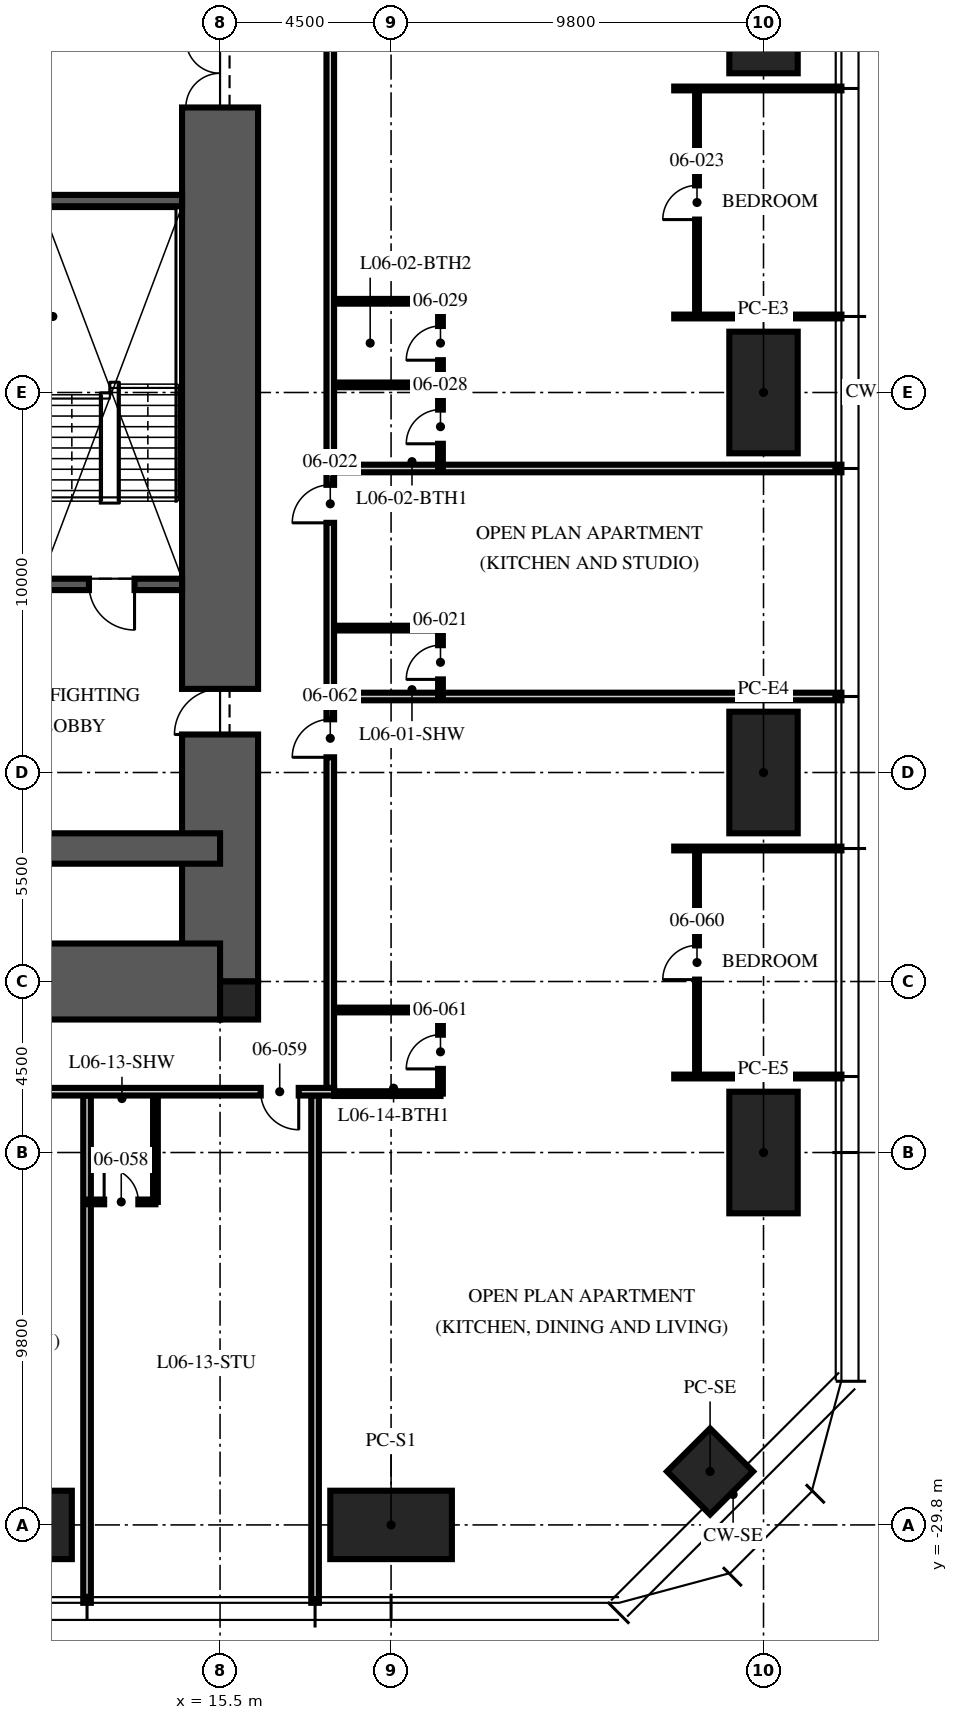
"""IFC4 building model, lengths in metres.
Left out: names, types, materials, properties, quantities, classifications, styles, units other than length and angle.
Written with IfcOpenShell. Run it as: python <this file> out.ifc"""

import sys

from ifc_helpers import new_model, si_unit, direction, frame, frame_2d, origin, origin_2d, place, context, subcontext, project, spatial, rectangle, hollow_rectangle, extrude, element, fill, save


model = new_model("IFC4")
c1 = context("Model", 3, precision=1e-05, world=origin(), true_north=direction((0.0, 1.0)))
c2 = subcontext(c1, "Body", "Model", "MODEL_VIEW")
j1 = project(units=[si_unit("LENGTHUNIT", "METRE"), si_unit("PLANEANGLEUNIT", "RADIAN")], contexts=[c1])
p1 = place(None, origin())
s1 = spatial("IfcSite", under=j1, at=p1, CompositionType="ELEMENT")
p2 = place(p1, origin())
s2 = spatial("IfcBuilding", under=s1, at=p2, CompositionType="ELEMENT")
p3 = place(p2, frame((0.0, 0.0, 28.5)))
s3 = spatial("IfcBuildingStorey", under=s2, at=p3, CompositionType="ELEMENT", Elevation=28.5)
p4 = place(p3, frame((15.5, -15.5, -0.25), z_axis=(0.0, 0.0, 1.0), x_axis=(0.0, 1.0, 0.0)))
e1 = element("IfcWall", 1, at=p4, inside=s3, PredefinedType="SHEAR", context=c2, shape_type="SweptSolid", body=[
    extrude(rectangle(XDim=31.0, YDim=2.0, at=frame_2d((15.5, 0.0))), origin(), (0.0, 0.0, 1.0), 3.75),
])
p5 = place(p4, frame((6.5, 0.0, 0.25)))
e2 = element("IfcOpeningElement", 2, at=p5, cuts=e1, PredefinedType="OPENING", context=c2, shape_type="SweptSolid", body=[
    extrude(rectangle(XDim=1.2, YDim=2.1, at=frame_2d((0.6, 1.05))), frame((0.0, 1.01, 0.0), z_axis=(0.0, -1.0, 0.0), x_axis=(1.0, 0.0, 0.0)), (0.0, 0.0, 1.0), 2.02),
])
p6 = place(p4, frame((23.0, 0.0, 0.25)))
e3 = element("IfcOpeningElement", 3, at=p6, cuts=e1, PredefinedType="OPENING", context=c2, shape_type="SweptSolid", body=[
    extrude(rectangle(XDim=1.8, YDim=2.1, at=frame_2d((0.9, 1.05))), frame((0.0, 1.01, 0.0), z_axis=(0.0, -1.0, 0.0), x_axis=(1.0, 0.0, 0.0)), (0.0, 0.0, 1.0), 2.02),
])
p7 = place(p3, frame((-15.5, -15.5, -0.25), z_axis=(0.0, 0.0, 1.0), x_axis=(1.0, 0.0, 0.0)))
e4 = element("IfcWall", 4, at=p7, inside=s3, PredefinedType="SHEAR", context=c2, shape_type="SweptSolid", body=[
    extrude(rectangle(XDim=31.0, YDim=2.0, at=frame_2d((15.5, 0.0))), origin(), (0.0, 0.0, 1.0), 3.75),
])
p8 = place(p3, frame((-15.5, -12.0, -0.25), z_axis=(0.0, 0.0, 1.0), x_axis=(1.0, 0.0, 0.0)))
e5 = element("IfcWall", 5, at=p8, inside=s3, PredefinedType="SHEAR", context=c2, shape_type="SweptSolid", body=[
    extrude(rectangle(XDim=31.0, YDim=0.8, at=frame_2d((15.5, 0.0))), origin(), (0.0, 0.0, 1.0), 3.75),
])
p9 = place(p3, frame((16.0, -16.0, -0.25), z_axis=(0.0, 0.0, 1.0), x_axis=(1.0, 0.0, 0.0)))
e6 = element("IfcColumn", 6, at=p9, inside=s3, PredefinedType="COLUMN", context=c2, shape_type="SweptSolid", body=[
    extrude(rectangle(XDim=1.0, YDim=1.0, at=origin_2d()), origin(), (0.0, 0.0, 1.0), 3.75),
])
for number, where, z_axis, x_axis in (
    (7, (29.8, 10.0, 0.0), (0.0, 0.0, 1.0), (0.0, 1.0, 0.0)),
    (8, (29.8, 0.0, 0.0), (0.0, 0.0, 1.0), (0.0, 1.0, 0.0)),
    (9, (29.8, -10.0, 0.0), (0.0, 0.0, 1.0), (0.0, 1.0, 0.0)),
    (10, (29.8, -20.0, 0.0), (0.0, 0.0, 1.0), (0.0, 1.0, 0.0)),
    (11, (20.0, -29.8, 0.0), (0.0, 0.0, 1.0), (1.0, 0.0, 0.0)),
    (12, (10.0, -29.8, 0.0), (0.0, 0.0, 1.0), (1.0, 0.0, 0.0)),
):
    element("IfcColumn", number, at=place(p3, frame(where, z_axis=z_axis, x_axis=x_axis)), inside=s3, PredefinedType="COLUMN", context=c2, shape_type="SweptSolid", body=[
        extrude(hollow_rectangle(XDim=3.2, YDim=1.8, WallThickness=0.2, at=origin_2d()), origin(), (0.0, 0.0, 1.0), 3.75),
    ])
p10 = place(p3, frame((28.394, -28.394, 0.0), z_axis=(0.0, 0.0, 1.0), x_axis=(0.707106781187, 0.707106781187, 0.0)))
e13 = element("IfcColumn", 13, at=p10, inside=s3, PredefinedType="COLUMN", context=c2, shape_type="SweptSolid", body=[
    extrude(hollow_rectangle(XDim=1.6, YDim=1.6, WallThickness=0.1, at=origin_2d()), origin(), (0.0, 0.0, 1.0), 3.75),
])
p11 = place(p3, frame((14.5, -5.05, 0.0), z_axis=(0.0, 0.0, 1.0), x_axis=(-1.0, 0.0, 0.0)))
e14 = element("IfcWall", 14, at=p11, inside=s3, PredefinedType="SOLIDWALL", context=c2, shape_type="SweptSolid", body=[
    extrude(rectangle(XDim=5.7, YDim=0.3, at=frame_2d((2.85, 0.0))), origin(), (0.0, 0.0, 1.0), 3.5),
])
p12 = place(p11, frame((1.25, 0.0, 0.0)))
e15 = element("IfcOpeningElement", 15, at=p12, cuts=e14, PredefinedType="OPENING", context=c2, shape_type="SweptSolid", body=[
    extrude(rectangle(XDim=1.2, YDim=2.1, at=frame_2d((0.6, 1.05))), frame((0.0, 0.16, 0.0), z_axis=(0.0, -1.0, 0.0), x_axis=(1.0, 0.0, 0.0)), (0.0, 0.0, 1.0), 0.32),
])
p13 = place(p3, frame((14.5, 5.05, 0.0), z_axis=(0.0, 0.0, 1.0), x_axis=(-1.0, 0.0, 0.0)))
e16 = element("IfcWall", 16, at=p13, inside=s3, PredefinedType="SOLIDWALL", context=c2, shape_type="SweptSolid", body=[
    extrude(rectangle(XDim=3.7, YDim=0.3, at=frame_2d((1.85, 0.0))), origin(), (0.0, 0.0, 1.0), 3.5),
])
for number, where, z_axis, x_axis in (
    (17, (18.5, -8.0, 0.0), (0.0, 0.0, 1.0), (1.0, 0.0, 0.0)),
    (18, (18.5, -2.0, 0.0), (0.0, 0.0, 1.0), (1.0, 0.0, 0.0)),
):
    element("IfcWall", number, at=place(p3, frame(where, z_axis=z_axis, x_axis=x_axis)), inside=s3, PredefinedType="PARTITIONING", context=c2, shape_type="SweptSolid", body=[
        extrude(rectangle(XDim=13.35, YDim=0.2, at=frame_2d((6.675, 0.0))), origin(), (0.0, 0.0, 1.0), 2.71),
    ])
for number, where, z_axis, x_axis in (
    (19, (27.45, 2.0, 0.0), (0.0, 0.0, 1.0), (1.0, 0.0, 0.0)),
    (20, (27.45, 8.0, 0.0), (0.0, 0.0, 1.0), (1.0, 0.0, 0.0)),
):
    element("IfcWall", number, at=place(p3, frame(where, z_axis=z_axis, x_axis=x_axis)), inside=s3, PredefinedType="PARTITIONING", context=c2, shape_type="SweptSolid", body=[
        extrude(rectangle(XDim=4.4, YDim=0.1, at=frame_2d((2.2, 0.0))), origin(), (0.0, 0.0, 1.0), 2.71),
    ])
p14 = place(p3, frame((12.0, -18.5, 0.0), z_axis=(0.0, 0.0, 1.0), x_axis=(0.0, -1.0, 0.0)))
e21 = element("IfcWall", 21, at=p14, inside=s3, PredefinedType="PARTITIONING", context=c2, shape_type="SweptSolid", body=[
    extrude(rectangle(XDim=13.35, YDim=0.2, at=frame_2d((6.675, 0.0))), origin(), (0.0, 0.0, 1.0), 2.71),
])
p15 = place(p3, frame((18.0, -18.5, 0.0), z_axis=(0.0, 0.0, 1.0), x_axis=(0.0, -1.0, 0.0)))
e22 = element("IfcWall", 22, at=p15, inside=s3, PredefinedType="PARTITIONING", context=c2, shape_type="SweptSolid", body=[
    extrude(rectangle(XDim=13.35, YDim=0.2, at=frame_2d((6.675, 0.0))), origin(), (0.0, 0.0, 1.0), 2.3),
])
for number, where, z_axis, x_axis in (
    (23, (27.45, -18.0, 0.0), (0.0, 0.0, 1.0), (1.0, 0.0, 0.0)),
    (24, (27.45, -12.0, 0.0), (0.0, 0.0, 1.0), (1.0, 0.0, 0.0)),
):
    element("IfcWall", number, at=place(p3, frame(where, z_axis=z_axis, x_axis=x_axis)), inside=s3, PredefinedType="PARTITIONING", context=c2, shape_type="SweptSolid", body=[
        extrude(rectangle(XDim=4.4, YDim=0.1, at=frame_2d((2.2, 0.0))), origin(), (0.0, 0.0, 1.0), 2.71),
    ])
p16 = place(p3, frame((21.3, -8.0, 0.0), z_axis=(0.0, 0.0, 1.0), x_axis=(0.0, 1.0, 0.0)))
e25 = element("IfcWall", 25, at=p16, inside=s3, PredefinedType="PARTITIONING", context=c2, shape_type="SweptSolid", body=[
    extrude(rectangle(XDim=1.8, YDim=0.125, at=frame_2d((0.9, 0.0))), origin(), (0.0, 0.0, 1.0), 3.5),
])
p17 = place(p16, frame((0.45, 0.0, 0.0)))
e26 = element("IfcOpeningElement", 26, at=p17, cuts=e25, PredefinedType="OPENING", context=c2, shape_type="SweptSolid", body=[
    extrude(rectangle(XDim=0.9, YDim=2.1, at=frame_2d((0.45, 1.05))), frame((0.0, 0.073, 0.0), z_axis=(0.0, -1.0, 0.0), x_axis=(1.0, 0.0, 0.0)), (0.0, 0.0, 1.0), 0.145),
])
p18 = place(p3, frame((18.5, -6.2, 0.0), z_axis=(0.0, 0.0, 1.0), x_axis=(1.0, 0.0, 0.0)))
e27 = element("IfcWall", 27, at=p18, inside=s3, PredefinedType="PARTITIONING", context=c2, shape_type="SweptSolid", body=[
    extrude(rectangle(XDim=2.8, YDim=0.125, at=frame_2d((1.4, 0.0))), origin(), (0.0, 0.0, 1.0), 3.5),
])
p19 = place(p3, frame((28.05, 2.0, 0.0), z_axis=(0.0, 0.0, 1.0), x_axis=(0.0, 1.0, 0.0)))
e28 = element("IfcWall", 28, at=p19, inside=s3, PredefinedType="PARTITIONING", context=c2, shape_type="SweptSolid", body=[
    extrude(rectangle(XDim=6.0, YDim=0.1, at=frame_2d((3.0, 0.0))), origin(), (0.0, 0.0, 1.0), 2.61),
])
p20 = place(p19, frame((2.55, 0.0, 0.0)))
e29 = element("IfcOpeningElement", 29, at=p20, cuts=e28, PredefinedType="OPENING", context=c2, shape_type="SweptSolid", body=[
    extrude(rectangle(XDim=0.9, YDim=2.1, at=frame_2d((0.45, 1.05))), frame((0.0, 0.06, 0.0), z_axis=(0.0, -1.0, 0.0), x_axis=(1.0, 0.0, 0.0)), (0.0, 0.0, 1.0), 0.12),
])
p21 = place(p3, frame((21.3, -2.0, 0.0), z_axis=(0.0, 0.0, 1.0), x_axis=(0.0, 1.0, 0.0)))
e30 = element("IfcWall", 30, at=p21, inside=s3, PredefinedType="PARTITIONING", context=c2, shape_type="SweptSolid", body=[
    extrude(rectangle(XDim=4.4, YDim=0.125, at=frame_2d((2.2, 0.0))), origin(), (0.0, 0.0, 1.0), 2.492),
])
p22 = place(p21, frame((0.65, 0.0, 0.0)))
e31 = element("IfcOpeningElement", 31, at=p22, cuts=e30, PredefinedType="OPENING", context=c2, shape_type="SweptSolid", body=[
    extrude(rectangle(XDim=0.9, YDim=2.1, at=frame_2d((0.45, 1.05))), frame((0.0, 0.073, 0.0), z_axis=(0.0, -1.0, 0.0), x_axis=(1.0, 0.0, 0.0)), (0.0, 0.0, 1.0), 0.145),
])
p23 = place(p21, frame((2.85, 0.0, 0.0)))
e32 = element("IfcOpeningElement", 32, at=p23, cuts=e30, PredefinedType="OPENING", context=c2, shape_type="SweptSolid", body=[
    extrude(rectangle(XDim=0.9, YDim=2.1, at=frame_2d((0.45, 1.05))), frame((0.0, 0.073, 0.0), z_axis=(0.0, -1.0, 0.0), x_axis=(1.0, 0.0, 0.0)), (0.0, 0.0, 1.0), 0.145),
])
p24 = place(p3, frame((18.5, 0.2, 0.0), z_axis=(0.0, 0.0, 1.0), x_axis=(1.0, 0.0, 0.0)))
e33 = element("IfcWall", 33, at=p24, inside=s3, PredefinedType="PARTITIONING", context=c2, shape_type="SweptSolid", body=[
    extrude(rectangle(XDim=2.8, YDim=0.125, at=frame_2d((1.4, 0.0))), origin(), (0.0, 0.0, 1.0), 2.492),
])
p25 = place(p3, frame((18.5, 2.4, 0.0), z_axis=(0.0, 0.0, 1.0), x_axis=(1.0, 0.0, 0.0)))
e34 = element("IfcWall", 34, at=p25, inside=s3, PredefinedType="PARTITIONING", context=c2, shape_type="SweptSolid", body=[
    extrude(rectangle(XDim=2.8, YDim=0.125, at=frame_2d((1.4, 0.0))), origin(), (0.0, 0.0, 1.0), 3.5),
])
p26 = place(p3, frame((12.0, -21.3, 0.0), z_axis=(0.0, 0.0, 1.0), x_axis=(1.0, 0.0, 0.0)))
e35 = element("IfcWall", 35, at=p26, inside=s3, PredefinedType="PARTITIONING", context=c2, shape_type="SweptSolid", body=[
    extrude(rectangle(XDim=1.8, YDim=0.125, at=frame_2d((0.9, 0.0))), origin(), (0.0, 0.0, 1.0), 3.5),
])
p27 = place(p26, frame((0.45, 0.0, 0.0)))
e36 = element("IfcOpeningElement", 36, at=p27, cuts=e35, PredefinedType="OPENING", context=c2, shape_type="SweptSolid", body=[
    extrude(rectangle(XDim=0.9, YDim=2.1, at=frame_2d((0.45, 1.05))), frame((0.0, 0.073, 0.0), z_axis=(0.0, -1.0, 0.0), x_axis=(1.0, 0.0, 0.0)), (0.0, 0.0, 1.0), 0.145),
])
p28 = place(p3, frame((13.8, -18.5, 0.0), z_axis=(0.0, 0.0, 1.0), x_axis=(0.0, -1.0, 0.0)))
e37 = element("IfcWall", 37, at=p28, inside=s3, PredefinedType="PARTITIONING", context=c2, shape_type="SweptSolid", body=[
    extrude(rectangle(XDim=2.8, YDim=0.125, at=frame_2d((1.4, 0.0))), origin(), (0.0, 0.0, 1.0), 3.5),
])
p29 = place(p3, frame((28.05, -18.0, 0.0), z_axis=(0.0, 0.0, 1.0), x_axis=(0.0, 1.0, 0.0)))
e38 = element("IfcWall", 38, at=p29, inside=s3, PredefinedType="PARTITIONING", context=c2, shape_type="SweptSolid", body=[
    extrude(rectangle(XDim=6.0, YDim=0.1, at=frame_2d((3.0, 0.0))), origin(), (0.0, 0.0, 1.0), 2.61),
])
p30 = place(p29, frame((2.55, 0.0, 0.0)))
e39 = element("IfcOpeningElement", 39, at=p30, cuts=e38, PredefinedType="OPENING", context=c2, shape_type="SweptSolid", body=[
    extrude(rectangle(XDim=0.9, YDim=2.1, at=frame_2d((0.45, 1.05))), frame((0.0, 0.06, 0.0), z_axis=(0.0, -1.0, 0.0), x_axis=(1.0, 0.0, 0.0)), (0.0, 0.0, 1.0), 0.12),
])
p31 = place(p3, frame((21.3, -18.45, 0.0), z_axis=(0.0, 0.0, 1.0), x_axis=(0.0, 1.0, 0.0)))
e40 = element("IfcWall", 40, at=p31, inside=s3, PredefinedType="PARTITIONING", context=c2, shape_type="SweptSolid", body=[
    extrude(rectangle(XDim=2.2, YDim=0.125, at=frame_2d((1.1, 0.0))), origin(), (0.0, 0.0, 1.0), 3.5),
])
p32 = place(p31, frame((0.65, 0.0, 0.0)))
e41 = element("IfcOpeningElement", 41, at=p32, cuts=e40, PredefinedType="OPENING", context=c2, shape_type="SweptSolid", body=[
    extrude(rectangle(XDim=0.9, YDim=2.1, at=frame_2d((0.45, 1.05))), frame((0.0, 0.073, 0.0), z_axis=(0.0, -1.0, 0.0), x_axis=(1.0, 0.0, 0.0)), (0.0, 0.0, 1.0), 0.145),
])
p33 = place(p3, frame((18.5, -18.45, 0.0), z_axis=(0.0, 0.0, 1.0), x_axis=(1.0, 0.0, 0.0)))
e42 = element("IfcWall", 42, at=p33, inside=s3, PredefinedType="PARTITIONING", context=c2, shape_type="SweptSolid", body=[
    extrude(rectangle(XDim=2.8, YDim=0.125, at=frame_2d((1.4, 0.0))), origin(), (0.0, 0.0, 1.0), 2.3),
])
p34 = place(p3, frame((18.5, -16.25, 0.0), z_axis=(0.0, 0.0, 1.0), x_axis=(1.0, 0.0, 0.0)))
e43 = element("IfcWall", 43, at=p34, inside=s3, PredefinedType="PARTITIONING", context=c2, shape_type="SweptSolid", body=[
    extrude(rectangle(XDim=2.8, YDim=0.125, at=frame_2d((1.4, 0.0))), origin(), (0.0, 0.0, 1.0), 3.5),
])
p35 = place(p3, frame((18.4, -18.3, 0.0), z_axis=(0.0, 0.0, 1.0), x_axis=(0.0, 1.0, 0.0)))
e44 = element("IfcWall", 44, at=p35, inside=s3, PredefinedType="PARTITIONING", context=c2, shape_type="SweptSolid", body=[
    extrude(rectangle(XDim=36.6, YDim=0.2, at=frame_2d((18.3, 0.0))), origin(), (0.0, 0.0, 1.0), 2.3),
])
p36 = place(p35, frame((14.87, 0.0, 0.0)))
e45 = element("IfcOpeningElement", 45, at=p36, cuts=e44, PredefinedType="OPENING", context=c2, shape_type="SweptSolid", body=[
    extrude(rectangle(XDim=1.0, YDim=2.2, at=frame_2d((0.5, 1.1))), frame((0.0, 0.11, 0.0), z_axis=(0.0, -1.0, 0.0), x_axis=(1.0, 0.0, 0.0)), (0.0, 0.0, 1.0), 0.22),
])
p37 = place(p35, frame((34.82, 0.0, 0.0)))
e46 = element("IfcOpeningElement", 46, at=p37, cuts=e44, PredefinedType="OPENING", context=c2, shape_type="SweptSolid", body=[
    extrude(rectangle(XDim=1.0, YDim=2.2, at=frame_2d((0.5, 1.1))), frame((0.0, 0.11, 0.0), z_axis=(0.0, -1.0, 0.0), x_axis=(1.0, 0.0, 0.0)), (0.0, 0.0, 1.0), 0.22),
])
p38 = place(p35, frame((8.7, 0.0, 0.0)))
e47 = element("IfcOpeningElement", 47, at=p38, cuts=e44, PredefinedType="OPENING", context=c2, shape_type="SweptSolid", body=[
    extrude(rectangle(XDim=1.0, YDim=2.2, at=frame_2d((0.5, 1.1))), frame((0.0, 0.11, 0.0), z_axis=(0.0, -1.0, 0.0), x_axis=(1.0, 0.0, 0.0)), (0.0, 0.0, 1.0), 0.22),
])
p39 = place(p3, frame((18.5, -18.4, 0.0), z_axis=(0.0, 0.0, 1.0), x_axis=(-1.0, 0.0, 0.0)))
e48 = element("IfcWall", 48, at=p39, inside=s3, PredefinedType="PARTITIONING", context=c2, shape_type="SweptSolid", body=[
    extrude(rectangle(XDim=14.5, YDim=0.2, at=frame_2d((7.25, 0.0))), origin(), (0.0, 0.0, 1.0), 2.3),
])
p40 = place(p39, frame((0.93, 0.0, 0.0)))
e49 = element("IfcOpeningElement", 49, at=p40, cuts=e48, PredefinedType="OPENING", context=c2, shape_type="SweptSolid", body=[
    extrude(rectangle(XDim=1.0, YDim=2.2, at=frame_2d((0.5, 1.1))), frame((0.0, 0.11, 0.0), z_axis=(0.0, -1.0, 0.0), x_axis=(1.0, 0.0, 0.0)), (0.0, 0.0, 1.0), 0.22),
])
p41 = place(p12, origin())
e50 = element("IfcDoor", 50, at=p41, inside=s3, OperationType="SINGLE_SWING_LEFT", PredefinedType="DOOR", context=c2, shape_type="SweptSolid", body=[
    extrude(rectangle(XDim=1.2, YDim=2.1, at=frame_2d((0.6, 1.05))), frame((0.0, 0.025, 0.0), z_axis=(0.0, -1.0, 0.0), x_axis=(1.0, 0.0, 0.0)), (0.0, 0.0, 1.0), 0.05),
])
fill(e15, e50)
p42 = place(p5, origin())
e51 = element("IfcDoor", 51, at=p42, inside=s3, OperationType="SINGLE_SWING_LEFT", PredefinedType="DOOR", context=c2, shape_type="SweptSolid", body=[
    extrude(rectangle(XDim=1.2, YDim=2.1, at=frame_2d((0.6, 1.05))), frame((0.0, 0.025, 0.0), z_axis=(0.0, -1.0, 0.0), x_axis=(1.0, 0.0, 0.0)), (0.0, 0.0, 1.0), 0.05),
])
fill(e2, e51)
p43 = place(p6, origin())
e52 = element("IfcDoor", 52, at=p43, inside=s3, OperationType="DOUBLE_DOOR_SINGLE_SWING", PredefinedType="DOOR", context=c2, shape_type="SweptSolid", body=[
    extrude(rectangle(XDim=1.8, YDim=2.1, at=frame_2d((0.9, 1.05))), frame((0.0, 0.025, 0.0), z_axis=(0.0, -1.0, 0.0), x_axis=(1.0, 0.0, 0.0)), (0.0, 0.0, 1.0), 0.05),
])
fill(e3, e52)
p44 = place(p17, origin())
e53 = element("IfcDoor", 53, at=p44, inside=s3, OperationType="SINGLE_SWING_LEFT", PredefinedType="DOOR", context=c2, shape_type="SweptSolid", body=[
    extrude(rectangle(XDim=0.9, YDim=2.1, at=frame_2d((0.45, 1.05))), frame((0.0, 0.025, 0.0), z_axis=(0.0, -1.0, 0.0), x_axis=(1.0, 0.0, 0.0)), (0.0, 0.0, 1.0), 0.05),
])
fill(e26, e53)
p45 = place(p36, origin())
e54 = element("IfcDoor", 54, at=p45, inside=s3, OperationType="SINGLE_SWING_LEFT", PredefinedType="DOOR", context=c2, shape_type="SweptSolid", body=[
    extrude(rectangle(XDim=1.0, YDim=2.2, at=frame_2d((0.5, 1.1))), frame((0.0, 0.025, 0.0), z_axis=(0.0, -1.0, 0.0), x_axis=(1.0, 0.0, 0.0)), (0.0, 0.0, 1.0), 0.05),
])
fill(e45, e54)
p46 = place(p20, origin())
e55 = element("IfcDoor", 55, at=p46, inside=s3, OperationType="SINGLE_SWING_LEFT", PredefinedType="DOOR", context=c2, shape_type="SweptSolid", body=[
    extrude(rectangle(XDim=0.9, YDim=2.1, at=frame_2d((0.45, 1.05))), frame((0.0, 0.025, 0.0), z_axis=(0.0, -1.0, 0.0), x_axis=(1.0, 0.0, 0.0)), (0.0, 0.0, 1.0), 0.05),
])
fill(e29, e55)
p47 = place(p22, origin())
e56 = element("IfcDoor", 56, at=p47, inside=s3, OperationType="SINGLE_SWING_LEFT", PredefinedType="DOOR", context=c2, shape_type="SweptSolid", body=[
    extrude(rectangle(XDim=0.9, YDim=2.1, at=frame_2d((0.45, 1.05))), frame((0.0, 0.025, 0.0), z_axis=(0.0, -1.0, 0.0), x_axis=(1.0, 0.0, 0.0)), (0.0, 0.0, 1.0), 0.05),
])
fill(e31, e56)
p48 = place(p23, origin())
e57 = element("IfcDoor", 57, at=p48, inside=s3, OperationType="SINGLE_SWING_LEFT", PredefinedType="DOOR", context=c2, shape_type="SweptSolid", body=[
    extrude(rectangle(XDim=0.9, YDim=2.1, at=frame_2d((0.45, 1.05))), frame((0.0, 0.025, 0.0), z_axis=(0.0, -1.0, 0.0), x_axis=(1.0, 0.0, 0.0)), (0.0, 0.0, 1.0), 0.05),
])
fill(e32, e57)
p49 = place(p27, origin())
e58 = element("IfcDoor", 58, at=p49, inside=s3, OperationType="SINGLE_SWING_LEFT", PredefinedType="DOOR", context=c2, shape_type="SweptSolid", body=[
    extrude(rectangle(XDim=0.9, YDim=2.1, at=frame_2d((0.45, 1.05))), frame((0.0, 0.025, 0.0), z_axis=(0.0, -1.0, 0.0), x_axis=(1.0, 0.0, 0.0)), (0.0, 0.0, 1.0), 0.05),
])
fill(e36, e58)
p50 = place(p40, origin())
e59 = element("IfcDoor", 59, at=p50, inside=s3, OperationType="SINGLE_SWING_LEFT", PredefinedType="DOOR", context=c2, shape_type="SweptSolid", body=[
    extrude(rectangle(XDim=1.0, YDim=2.2, at=frame_2d((0.5, 1.1))), frame((0.0, 0.025, 0.0), z_axis=(0.0, -1.0, 0.0), x_axis=(1.0, 0.0, 0.0)), (0.0, 0.0, 1.0), 0.05),
])
fill(e49, e59)
p51 = place(p30, origin())
e60 = element("IfcDoor", 60, at=p51, inside=s3, OperationType="SINGLE_SWING_LEFT", PredefinedType="DOOR", context=c2, shape_type="SweptSolid", body=[
    extrude(rectangle(XDim=0.9, YDim=2.1, at=frame_2d((0.45, 1.05))), frame((0.0, 0.025, 0.0), z_axis=(0.0, -1.0, 0.0), x_axis=(1.0, 0.0, 0.0)), (0.0, 0.0, 1.0), 0.05),
])
fill(e39, e60)
p52 = place(p32, origin())
e61 = element("IfcDoor", 61, at=p52, inside=s3, OperationType="SINGLE_SWING_LEFT", PredefinedType="DOOR", context=c2, shape_type="SweptSolid", body=[
    extrude(rectangle(XDim=0.9, YDim=2.1, at=frame_2d((0.45, 1.05))), frame((0.0, 0.025, 0.0), z_axis=(0.0, -1.0, 0.0), x_axis=(1.0, 0.0, 0.0)), (0.0, 0.0, 1.0), 0.05),
])
fill(e41, e61)
p53 = place(p38, origin())
e62 = element("IfcDoor", 62, at=p53, inside=s3, OperationType="SINGLE_SWING_LEFT", PredefinedType="DOOR", context=c2, shape_type="SweptSolid", body=[
    extrude(rectangle(XDim=1.0, YDim=2.2, at=frame_2d((0.5, 1.1))), frame((0.0, 0.025, 0.0), z_axis=(0.0, -1.0, 0.0), x_axis=(1.0, 0.0, 0.0)), (0.0, 0.0, 1.0), 0.05),
])
fill(e47, e62)
save(model, sys.argv[1])
